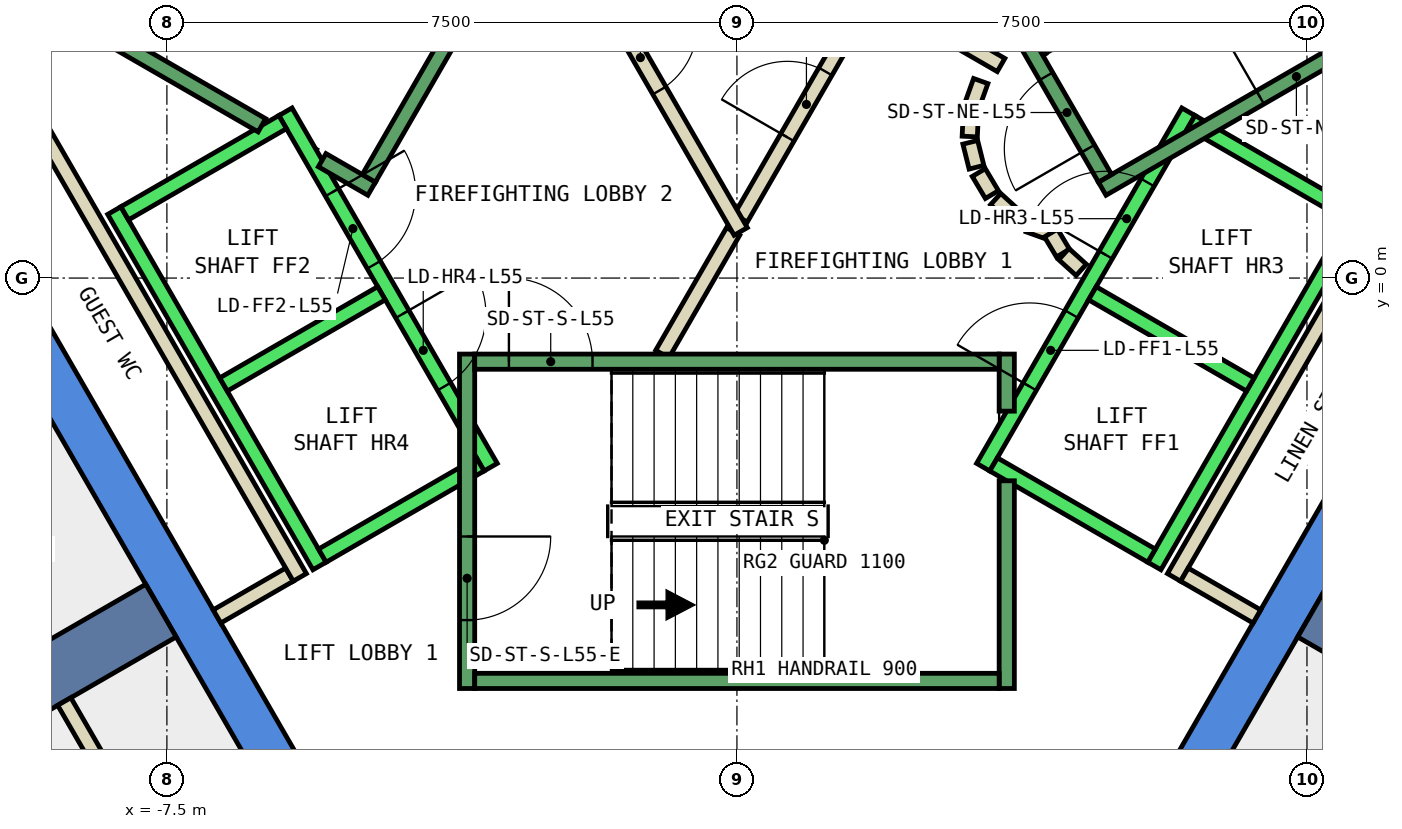
"""IFC4 building model, lengths in metres.
Left out: names, types, materials, properties, quantities, classifications, styles, units other than length and angle.
Written with IfcOpenShell. Run it as: python <this file> out.ifc"""

import sys

from ifc_helpers import new_model, si_unit, direction, frame, frame_2d, origin, place, context, subcontext, project, spatial, polyline, rectangle, outline, extrude, element, fill, save


model = new_model("IFC4")
c1 = context("Model", 3, precision=1e-05, world=origin(), true_north=direction((0.0, 1.0)))
c2 = subcontext(c1, "Body", "Model", "MODEL_VIEW")
j1 = project(units=[si_unit("LENGTHUNIT", "METRE"), si_unit("PLANEANGLEUNIT", "RADIAN")], contexts=[c1])
p1 = place(None, origin())
s1 = spatial("IfcSite", under=j1, at=p1, CompositionType="ELEMENT")
p2 = place(p1, origin())
s2 = spatial("IfcBuilding", under=s1, at=p2, CompositionType="ELEMENT")
p3 = place(p2, frame((0.0, 0.0, 245.0)))
s3 = spatial("IfcBuildingStorey", under=s2, at=p3, CompositionType="ELEMENT", Elevation=245.0)
p4 = place(p3, frame((0.0, 0.0, -0.34)))
e1 = element("IfcWall", 1, at=p4, inside=s3, PredefinedType="SHEAR", context=c2, shape_type="SweptSolid", body=[
    extrude(outline(polyline([(6.786, 10.747), (6.266, 10.447), (10.854, 2.5), (11.547, 2.5), (6.786, 10.747)])), origin(), (0.0, 0.0, 1.0), 3.6),
])
p5 = place(p3, frame((0.0, 0.0, -0.34)))
e2 = element("IfcWall", 2, at=p5, inside=s3, PredefinedType="SHEAR", context=c2, shape_type="SweptSolid", body=[
    extrude(outline(polyline([(-11.547, 2.5), (-5.774, -7.5), (-5.427, -6.9), (-10.854, 2.5), (-11.547, 2.5)])), origin(), (0.0, 0.0, 1.0), 3.6),
])
p6 = place(p3, frame((0.0, 0.0, -0.34)))
e3 = element("IfcWall", 3, at=p6, inside=s3, PredefinedType="SHEAR", context=c2, shape_type="SweptSolid", body=[
    extrude(outline(polyline([(5.774, -7.5), (11.547, 2.5), (10.854, 2.5), (5.427, -6.9), (5.774, -7.5)])), origin(), (0.0, 0.0, 1.0), 3.6),
])
for number, where, z_axis, x_axis in (
    (4, (7.578, -4.375, -0.34), (0.0, 0.0, 1.0), (0.866, -0.5, 0.0)),
    (5, (-7.578, -4.375, -0.34), (0.0, 0.0, 1.0), (-0.866, -0.5, 0.0)),
):
    element("IfcWall", number, at=place(p3, frame(where, z_axis=z_axis, x_axis=x_axis)), inside=s3, PredefinedType="SHEAR", context=c2, shape_type="SweptSolid", body=[
        extrude(rectangle(XDim=9.0, YDim=0.8, at=frame_2d((4.5, 0.0))), origin(), (0.0, 0.0, 1.0), 3.6),
    ])
p7 = place(p3, frame((-8.235, -6.636, 0.0), z_axis=(0.0, 0.0, 1.0), x_axis=(-0.500089055364, 0.86597398154, 0.0)))
e6 = element("IfcWall", 6, at=p7, inside=s3, PredefinedType="PARTITIONING", context=c2, shape_type="SweptSolid", body=[
    extrude(rectangle(XDim=1.23, YDim=0.2, at=frame_2d((0.615, 0.0))), origin(), (0.0, 0.0, 1.0), 3.26),
])
p8 = place(p3, frame((5.751, -3.938, 0.0), z_axis=(0.0, 0.0, 1.0), x_axis=(0.500034260056, 0.866005622828, 0.0)))
e7 = element("IfcWall", 7, at=p8, inside=s3, PredefinedType="PARTITIONING", context=c2, shape_type="SweptSolid", body=[
    extrude(rectangle(XDim=5.399, YDim=0.2, at=frame_2d((2.7, 0.0))), origin(), (0.0, 0.0, 1.0), 3.26),
])
for number, where, z_axis, x_axis in (
    (8, (6.841, -4.452, 0.0), (0.0, 0.0, 1.0), (-0.866, 0.5, 0.0)),
    (9, (-5.888, -3.902, 0.0), (0.0, 0.0, 1.0), (-0.866, -0.5, 0.0)),
):
    element("IfcWall", number, at=place(p3, frame(where, z_axis=z_axis, x_axis=x_axis)), inside=s3, PredefinedType="PARTITIONING", context=c2, shape_type="SweptSolid", body=[
        extrude(rectangle(XDim=1.1, YDim=0.2, at=frame_2d((0.55, 0.0))), origin(), (0.0, 0.0, 1.0), 3.26),
    ])
p9 = place(p3, frame((-9.751, 2.99, 0.0), z_axis=(0.0, 0.0, 1.0), x_axis=(0.500012163284, -0.866018381195, 0.0)))
e10 = element("IfcWall", 10, at=p9, inside=s3, PredefinedType="PARTITIONING", context=c2, shape_type="SweptSolid", body=[
    extrude(rectangle(XDim=8.0, YDim=0.2, at=frame_2d((4.0, 0.0))), origin(), (0.0, 0.0, 1.0), 3.26),
])
p10 = place(p3, frame((-0.982, -1.0, 0.0), z_axis=(0.0, 0.0, 1.0), x_axis=(0.50024047865, 0.865886518847, 0.0)))
e11 = element("IfcWall", 11, at=p10, inside=s3, PredefinedType="PARTITIONING", context=c2, shape_type="SweptSolid", body=[
    extrude(rectangle(XDim=1.863, YDim=0.2, at=frame_2d((0.931, 0.0))), origin(), (0.0, 0.0, 1.0), 3.26),
])
p11 = place(p3, frame((0.05, 0.787, 0.0), z_axis=(0.0, 0.0, 1.0), x_axis=(0.499954076797, 0.866051915934, 0.0)))
e12 = element("IfcWall", 12, at=p11, inside=s3, PredefinedType="PARTITIONING", context=c2, shape_type="SweptSolid", body=[
    extrude(rectangle(XDim=3.558, YDim=0.2, at=frame_2d((1.779, 0.0))), origin(), (0.0, 0.0, 1.0), 3.26),
])
p12 = place(p11, frame((1.229, 0.0, 0.0)))
e13 = element("IfcOpeningElement", 13, at=p12, cuts=e12, PredefinedType="OPENING", context=c2, shape_type="SweptSolid", body=[
    extrude(rectangle(XDim=1.0, YDim=2.1, at=frame_2d((0.5, 1.05))), frame((0.0, 0.11, 0.0), z_axis=(0.0, -1.0, 0.0), x_axis=(1.0, 0.0, 0.0)), (0.0, 0.0, 1.0), 0.22),
])
p13 = place(p3, frame((1.866, 3.732, 0.0), z_axis=(0.0, 0.0, 1.0), x_axis=(0.866043361281, -0.499968895414, 0.0)))
e14 = element("IfcWall", 14, at=p13, inside=s3, PredefinedType="PARTITIONING", context=c2, shape_type="SweptSolid", body=[
    extrude(rectangle(XDim=1.858, YDim=0.2, at=frame_2d((0.929, 0.0))), origin(), (0.0, 0.0, 1.0), 3.26),
])
p14 = place(p3, frame((3.208, 2.592, 0.0), z_axis=(0.0, 0.0, 1.0), x_axis=(-0.337388820924, -0.941365382578, 0.0)))
e15 = element("IfcWall", 15, at=p14, inside=s3, PredefinedType="PARTITIONING", context=c2, shape_type="SweptSolid", body=[
    extrude(rectangle(XDim=0.338, YDim=0.2, at=frame_2d((0.169, 0.0))), origin(), (0.0, 0.0, 1.0), 3.26),
])
p15 = place(p3, frame((3.079, 2.199, 0.0), z_axis=(0.0, 0.0, 1.0), x_axis=(-0.047771483479, -0.998858290933, 0.0)))
e16 = element("IfcWall", 16, at=p15, inside=s3, PredefinedType="PARTITIONING", context=c2, shape_type="SweptSolid", body=[
    extrude(rectangle(XDim=0.337, YDim=0.2, at=frame_2d((0.169, 0.0))), origin(), (0.0, 0.0, 1.0), 3.26),
])
p16 = place(p3, frame((3.07, 1.786, 0.0), z_axis=(0.0, 0.0, 1.0), x_axis=(0.242705583207, -0.970099994784, 0.0)))
e17 = element("IfcWall", 17, at=p16, inside=s3, PredefinedType="PARTITIONING", context=c2, shape_type="SweptSolid", body=[
    extrude(rectangle(XDim=0.338, YDim=0.2, at=frame_2d((0.169, 0.0))), origin(), (0.0, 0.0, 1.0), 3.26),
])
for number, where, z_axis, x_axis in (
    (18, (3.182, 1.388, 0.0), (0.0, 0.0, 1.0), (0.512, -0.859, 0.0)),
    (19, (3.404, 1.039, 0.0), (0.0, 0.0, 1.0), (0.74, -0.672, 0.0)),
):
    element("IfcWall", number, at=place(p3, frame(where, z_axis=z_axis, x_axis=x_axis)), inside=s3, PredefinedType="PARTITIONING", context=c2, shape_type="SweptSolid", body=[
        extrude(rectangle(XDim=0.338, YDim=0.2, at=frame_2d((0.169, 0.0))), origin(), (0.0, 0.0, 1.0), 3.26),
    ])
p17 = place(p3, frame((3.838, 0.702, 0.0), z_axis=(0.0, 0.0, 1.0), x_axis=(0.941035081519, -0.338308993895, 0.0)))
e20 = element("IfcWall", 20, at=p17, inside=s3, PredefinedType="PARTITIONING", context=c2, shape_type="SweptSolid", body=[
    extrude(rectangle(XDim=0.337, YDim=0.2, at=frame_2d((0.168, 0.0))), origin(), (0.0, 0.0, 1.0), 3.26),
])
p18 = place(p3, frame((4.132, 0.593, 0.0), z_axis=(0.0, 0.0, 1.0), x_axis=(0.513561617048, -0.858052717201, 0.0)))
e21 = element("IfcWall", 21, at=p18, inside=s3, PredefinedType="PARTITIONING", context=c2, shape_type="SweptSolid", body=[
    extrude(rectangle(XDim=0.308, YDim=0.2, at=frame_2d((0.154, 0.0))), origin(), (0.0, 0.0, 1.0), 3.26),
])
p19 = place(p3, frame((4.301, 0.315, 0.0), z_axis=(0.0, 0.0, 1.0), x_axis=(0.741798017506, -0.670623367639, 0.0)))
e22 = element("IfcWall", 22, at=p19, inside=s3, PredefinedType="PARTITIONING", context=c2, shape_type="SweptSolid", body=[
    extrude(rectangle(XDim=0.309, YDim=0.2, at=frame_2d((0.154, 0.0))), origin(), (0.0, 0.0, 1.0), 3.26),
])
p20 = place(p3, frame((-2.54, 5.1, 0.0), z_axis=(0.0, 0.0, 1.0), x_axis=(0.499925051871, -0.866068670783, 0.0)))
e23 = element("IfcWall", 23, at=p20, inside=s3, PredefinedType="PARTITIONING", context=c2, shape_type="SweptSolid", body=[
    extrude(rectangle(XDim=5.181, YDim=0.2, at=frame_2d((2.59, 0.0))), origin(), (0.0, 0.0, 1.0), 3.26),
])
p21 = place(p20, frame((2.04, 0.0, 0.0)))
e24 = element("IfcOpeningElement", 24, at=p21, cuts=e23, PredefinedType="OPENING", context=c2, shape_type="SweptSolid", body=[
    extrude(rectangle(XDim=1.0, YDim=2.1, at=frame_2d((0.5, 1.05))), frame((0.0, 0.11, 0.0), z_axis=(0.0, -1.0, 0.0), x_axis=(1.0, 0.0, 0.0)), (0.0, 0.0, 1.0), 0.22),
])
p22 = place(p3, frame((-5.94, 2.188, 0.0), z_axis=(0.0, 0.0, 1.0), x_axis=(0.500034260056, -0.866005622828, 0.0)))
e25 = element("IfcWall", 25, at=p22, inside=s3, PredefinedType="STANDARD", context=c2, shape_type="SweptSolid", body=[
    extrude(rectangle(XDim=5.399, YDim=0.2, at=frame_2d((2.7, 0.0))), origin(), (0.0, 0.0, 1.0), 3.26),
])
p23 = place(p22, frame((3.075, 0.0, 0.0)))
e26 = element("IfcOpeningElement", 26, at=p23, cuts=e25, PredefinedType="OPENING", context=c2, shape_type="SweptSolid", body=[
    extrude(rectangle(XDim=1.1, YDim=2.1, at=frame_2d((0.55, 1.05))), frame((0.0, 0.11, 0.0), z_axis=(0.0, -1.0, 0.0), x_axis=(1.0, 0.0, 0.0)), (0.0, 0.0, 1.0), 0.22),
])
p24 = place(p22, frame((1.225, 0.0, 0.0)))
e27 = element("IfcOpeningElement", 27, at=p24, cuts=e25, PredefinedType="OPENING", context=c2, shape_type="SweptSolid", body=[
    extrude(rectangle(XDim=1.1, YDim=2.1, at=frame_2d((0.55, 1.05))), frame((0.0, 0.11, 0.0), z_axis=(0.0, -1.0, 0.0), x_axis=(1.0, 0.0, 0.0)), (0.0, 0.0, 1.0), 0.22),
])
p25 = place(p3, frame((-8.192, 0.888, 0.0), z_axis=(0.0, 0.0, 1.0), x_axis=(0.500034260056, -0.866005622828, 0.0)))
e28 = element("IfcWall", 28, at=p25, inside=s3, PredefinedType="STANDARD", context=c2, shape_type="SweptSolid", body=[
    extrude(rectangle(XDim=5.399, YDim=0.2, at=frame_2d((2.7, 0.0))), origin(), (0.0, 0.0, 1.0), 3.26),
])
for number, where, z_axis, x_axis in (
    (29, (-5.977, 2.052, 0.0), (0.0, 0.0, 1.0), (-0.866, -0.5, 0.0)),
    (30, (-4.677, -0.2, 0.0), (0.0, 0.0, 1.0), (-0.866, -0.5, 0.0)),
):
    element("IfcWall", number, at=place(p3, frame(where, z_axis=z_axis, x_axis=x_axis)), inside=s3, PredefinedType="STANDARD", context=c2, shape_type="SweptSolid", body=[
        extrude(rectangle(XDim=2.399, YDim=0.2, at=frame_2d((1.2, 0.0))), origin(), (0.0, 0.0, 1.0), 3.26),
    ])
p26 = place(p3, frame((-3.377, -2.452, 0.0), z_axis=(0.0, 0.0, 1.0), x_axis=(-0.865955154139, -0.50012165622, 0.0)))
e31 = element("IfcWall", 31, at=p26, inside=s3, PredefinedType="STANDARD", context=c2, shape_type="SweptSolid", body=[
    extrude(rectangle(XDim=2.4, YDim=0.2, at=frame_2d((1.2, 0.0))), origin(), (0.0, 0.0, 1.0), 3.26),
])
p27 = place(p3, frame((3.24, -2.488, 0.0), z_axis=(0.0, 0.0, 1.0), x_axis=(0.500034260056, 0.866005622828, 0.0)))
e32 = element("IfcWall", 32, at=p27, inside=s3, PredefinedType="STANDARD", context=c2, shape_type="SweptSolid", body=[
    extrude(rectangle(XDim=5.399, YDim=0.2, at=frame_2d((2.7, 0.0))), origin(), (0.0, 0.0, 1.0), 3.26),
])
p28 = place(p27, frame((3.225, 0.0, 0.0)))
e33 = element("IfcOpeningElement", 33, at=p28, cuts=e32, PredefinedType="OPENING", context=c2, shape_type="SweptSolid", body=[
    extrude(rectangle(XDim=1.1, YDim=2.1, at=frame_2d((0.55, 1.05))), frame((0.0, 0.11, 0.0), z_axis=(0.0, -1.0, 0.0), x_axis=(1.0, 0.0, 0.0)), (0.0, 0.0, 1.0), 0.22),
])
p29 = place(p27, frame((1.225, 0.0, 0.0)))
e34 = element("IfcOpeningElement", 34, at=p29, cuts=e32, PredefinedType="OPENING", context=c2, shape_type="SweptSolid", body=[
    extrude(rectangle(XDim=1.1, YDim=2.1, at=frame_2d((0.55, 1.05))), frame((0.0, 0.11, 0.0), z_axis=(0.0, -1.0, 0.0), x_axis=(1.0, 0.0, 0.0)), (0.0, 0.0, 1.0), 0.22),
])
p30 = place(p3, frame((5.492, -3.788, 0.0), z_axis=(0.0, 0.0, 1.0), x_axis=(0.500034260056, 0.866005622828, 0.0)))
e35 = element("IfcWall", 35, at=p30, inside=s3, PredefinedType="STANDARD", context=c2, shape_type="SweptSolid", body=[
    extrude(rectangle(XDim=5.399, YDim=0.2, at=frame_2d((2.7, 0.0))), origin(), (0.0, 0.0, 1.0), 3.26),
])
p31 = place(p3, frame((3.377, -2.452, 0.0), z_axis=(0.0, 0.0, 1.0), x_axis=(0.865955154139, -0.50012165622, 0.0)))
e36 = element("IfcWall", 36, at=p31, inside=s3, PredefinedType="STANDARD", context=c2, shape_type="SweptSolid", body=[
    extrude(rectangle(XDim=2.4, YDim=0.2, at=frame_2d((1.2, 0.0))), origin(), (0.0, 0.0, 1.0), 3.26),
])
for number, where, z_axis, x_axis in (
    (37, (4.677, -0.2, 0.0), (0.0, 0.0, 1.0), (0.866, -0.5, 0.0)),
    (38, (5.977, 2.052, 0.0), (0.0, 0.0, 1.0), (0.866, -0.5, 0.0)),
):
    element("IfcWall", number, at=place(p3, frame(where, z_axis=z_axis, x_axis=x_axis)), inside=s3, PredefinedType="STANDARD", context=c2, shape_type="SweptSolid", body=[
        extrude(rectangle(XDim=2.399, YDim=0.2, at=frame_2d((1.2, 0.0))), origin(), (0.0, 0.0, 1.0), 3.26),
    ])
p32 = place(p3, frame((-3.55, -1.0, 0.0), z_axis=(0.0, 0.0, 1.0), x_axis=(0.0, -1.0, 0.0)))
e39 = element("IfcWall", 39, at=p32, inside=s3, PredefinedType="STANDARD", context=c2, shape_type="SweptSolid", body=[
    extrude(rectangle(XDim=4.4, YDim=0.2, at=frame_2d((2.2, 0.0))), origin(), (0.0, 0.0, 1.0), 3.26),
])
p33 = place(p32, frame((2.4, 0.0, 0.0)))
e40 = element("IfcOpeningElement", 40, at=p33, cuts=e39, PredefinedType="OPENING", context=c2, shape_type="SweptSolid", body=[
    extrude(rectangle(XDim=1.1, YDim=2.2, at=frame_2d((0.55, 1.1))), frame((0.0, 0.11, 0.0), z_axis=(0.0, -1.0, 0.0), x_axis=(1.0, 0.0, 0.0)), (0.0, 0.0, 1.0), 0.22),
])
p34 = place(p3, frame((3.55, -2.667, 0.0), z_axis=(0.0, 0.0, 1.0), x_axis=(0.0, -1.0, 0.0)))
e41 = element("IfcWall", 41, at=p34, inside=s3, PredefinedType="STANDARD", context=c2, shape_type="SweptSolid", body=[
    extrude(rectangle(XDim=2.733, YDim=0.2, at=frame_2d((1.366, 0.0))), origin(), (0.0, 0.0, 1.0), 3.26),
])
p35 = place(p3, frame((3.55, -1.0, 0.0), z_axis=(0.0, 0.0, 1.0), x_axis=(0.0, -1.0, 0.0)))
e42 = element("IfcWall", 42, at=p35, inside=s3, PredefinedType="STANDARD", context=c2, shape_type="SweptSolid", body=[
    extrude(rectangle(XDim=0.751, YDim=0.2, at=frame_2d((0.375, 0.0))), origin(), (0.0, 0.0, 1.0), 3.26),
])
p36 = place(p3, frame((-3.45, -1.1, 0.0), z_axis=(0.0, 0.0, 1.0), x_axis=(1.0, 0.0, 0.0)))
e43 = element("IfcWall", 43, at=p36, inside=s3, PredefinedType="STANDARD", context=c2, shape_type="SweptSolid", body=[
    extrude(rectangle(XDim=6.9, YDim=0.2, at=frame_2d((3.45, 0.0))), origin(), (0.0, 0.0, 1.0), 3.26),
])
p37 = place(p36, frame((0.45, 0.0, 0.0)))
e44 = element("IfcOpeningElement", 44, at=p37, cuts=e43, PredefinedType="OPENING", context=c2, shape_type="SweptSolid", body=[
    extrude(rectangle(XDim=1.1, YDim=2.2, at=frame_2d((0.55, 1.1))), frame((0.0, 0.11, 0.0), z_axis=(0.0, -1.0, 0.0), x_axis=(1.0, 0.0, 0.0)), (0.0, 0.0, 1.0), 0.22),
])
p38 = place(p3, frame((-3.45, -5.3, 0.0), z_axis=(0.0, 0.0, 1.0), x_axis=(1.0, 0.0, 0.0)))
e45 = element("IfcWall", 45, at=p38, inside=s3, PredefinedType="STANDARD", context=c2, shape_type="SweptSolid", body=[
    extrude(rectangle(XDim=6.9, YDim=0.2, at=frame_2d((3.45, 0.0))), origin(), (0.0, 0.0, 1.0), 3.26),
])
p39 = place(p3, frame((4.806, 1.176, 0.0), z_axis=(0.0, 0.0, 1.0), x_axis=(0.866059941101, 0.499940174841, 0.0)))
e46 = element("IfcWall", 46, at=p39, inside=s3, PredefinedType="STANDARD", context=c2, shape_type="SweptSolid", body=[
    extrude(rectangle(XDim=4.4, YDim=0.2, at=frame_2d((2.2, 0.0))), origin(), (0.0, 0.0, 1.0), 3.26),
])
p40 = place(p39, frame((2.4, 0.0, 0.0)))
e47 = element("IfcOpeningElement", 47, at=p40, cuts=e46, PredefinedType="OPENING", context=c2, shape_type="SweptSolid", body=[
    extrude(rectangle(XDim=1.1, YDim=2.2, at=frame_2d((0.55, 1.1))), frame((0.0, 0.11, 0.0), z_axis=(0.0, -1.0, 0.0), x_axis=(1.0, 0.0, 0.0)), (0.0, 0.0, 1.0), 0.22),
])
p41 = place(p3, frame((4.843, 1.312, 0.0), z_axis=(0.0, 0.0, 1.0), x_axis=(-0.499963383562, 0.866046543262, 0.0)))
e48 = element("IfcWall", 48, at=p41, inside=s3, PredefinedType="STANDARD", context=c2, shape_type="SweptSolid", body=[
    extrude(rectangle(XDim=6.9, YDim=0.2, at=frame_2d((3.45, 0.0))), origin(), (0.0, 0.0, 1.0), 3.26),
])
p42 = place(p41, frame((0.45, 0.0, 0.0)))
e49 = element("IfcOpeningElement", 49, at=p42, cuts=e48, PredefinedType="OPENING", context=c2, shape_type="SweptSolid", body=[
    extrude(rectangle(XDim=1.1, YDim=2.2, at=frame_2d((0.55, 1.1))), frame((0.0, 0.11, 0.0), z_axis=(0.0, -1.0, 0.0), x_axis=(1.0, 0.0, 0.0)), (0.0, 0.0, 1.0), 0.22),
])
p43 = place(p3, frame((-6.25, 2.01, 0.0), z_axis=(0.0, 0.0, 1.0), x_axis=(-0.86611865017, 0.499838457731, 0.0)))
e50 = element("IfcWall", 50, at=p43, inside=s3, PredefinedType="STANDARD", context=c2, shape_type="SweptSolid", body=[
    extrude(rectangle(XDim=2.733, YDim=0.2, at=frame_2d((1.366, 0.0))), origin(), (0.0, 0.0, 1.0), 3.26),
])
p44 = place(p3, frame((-4.806, 1.176, 0.0), z_axis=(0.0, 0.0, 1.0), x_axis=(-0.866558586415, 0.499075361355, 0.0)))
e51 = element("IfcWall", 51, at=p44, inside=s3, PredefinedType="STANDARD", context=c2, shape_type="SweptSolid", body=[
    extrude(rectangle(XDim=0.751, YDim=0.2, at=frame_2d((0.376, 0.0))), origin(), (0.0, 0.0, 1.0), 3.26),
])
p45 = place(p3, frame((-1.393, 7.288, 0.0), z_axis=(0.0, 0.0, 1.0), x_axis=(-0.499963383562, -0.866046543262, 0.0)))
e52 = element("IfcWall", 52, at=p45, inside=s3, PredefinedType="STANDARD", context=c2, shape_type="SweptSolid", body=[
    extrude(rectangle(XDim=6.9, YDim=0.2, at=frame_2d((3.45, 0.0))), origin(), (0.0, 0.0, 1.0), 3.26),
])
p46 = place(p45, frame((0.45, 0.0, 0.0)))
e53 = element("IfcOpeningElement", 53, at=p46, cuts=e52, PredefinedType="OPENING", context=c2, shape_type="SweptSolid", body=[
    extrude(rectangle(XDim=1.1, YDim=2.2, at=frame_2d((0.55, 1.1))), frame((0.0, 0.11, 0.0), z_axis=(0.0, -1.0, 0.0), x_axis=(1.0, 0.0, 0.0)), (0.0, 0.0, 1.0), 0.22),
])
p47 = place(p12, origin())
e54 = element("IfcDoor", 54, at=p47, inside=s3, OperationType="SINGLE_SWING_RIGHT", PredefinedType="DOOR", context=c2, shape_type="SweptSolid", body=[
    extrude(rectangle(XDim=1.0, YDim=2.1, at=frame_2d((0.5, 1.05))), frame((0.0, 0.025, 0.0), z_axis=(0.0, -1.0, 0.0), x_axis=(1.0, 0.0, 0.0)), (0.0, 0.0, 1.0), 0.05),
])
fill(e13, e54)
p48 = place(p21, origin())
e55 = element("IfcDoor", 55, at=p48, inside=s3, OperationType="SINGLE_SWING_RIGHT", PredefinedType="DOOR", context=c2, shape_type="SweptSolid", body=[
    extrude(rectangle(XDim=1.0, YDim=2.1, at=frame_2d((0.5, 1.05))), frame((0.0, 0.025, 0.0), z_axis=(0.0, -1.0, 0.0), x_axis=(1.0, 0.0, 0.0)), (0.0, 0.0, 1.0), 0.05),
])
fill(e24, e55)
p49 = place(p28, origin())
e56 = element("IfcDoor", 56, at=p49, inside=s3, OperationType="SLIDING_TO_LEFT", PredefinedType="DOOR", context=c2, shape_type="SweptSolid", body=[
    extrude(rectangle(XDim=1.1, YDim=2.1, at=frame_2d((0.55, 1.05))), frame((0.0, 0.025, 0.0), z_axis=(0.0, -1.0, 0.0), x_axis=(1.0, 0.0, 0.0)), (0.0, 0.0, 1.0), 0.05),
])
fill(e33, e56)
p50 = place(p23, origin())
e57 = element("IfcDoor", 57, at=p50, inside=s3, OperationType="SLIDING_TO_LEFT", PredefinedType="DOOR", context=c2, shape_type="SweptSolid", body=[
    extrude(rectangle(XDim=1.1, YDim=2.1, at=frame_2d((0.55, 1.05))), frame((0.0, 0.025, 0.0), z_axis=(0.0, -1.0, 0.0), x_axis=(1.0, 0.0, 0.0)), (0.0, 0.0, 1.0), 0.05),
])
fill(e26, e57)
p51 = place(p29, origin())
e58 = element("IfcDoor", 58, at=p51, inside=s3, OperationType="SLIDING_TO_LEFT", PredefinedType="DOOR", context=c2, shape_type="SweptSolid", body=[
    extrude(rectangle(XDim=1.1, YDim=2.1, at=frame_2d((0.55, 1.05))), frame((0.0, 0.025, 0.0), z_axis=(0.0, -1.0, 0.0), x_axis=(1.0, 0.0, 0.0)), (0.0, 0.0, 1.0), 0.05),
])
fill(e34, e58)
p52 = place(p24, origin())
e59 = element("IfcDoor", 59, at=p52, inside=s3, OperationType="SLIDING_TO_LEFT", PredefinedType="DOOR", context=c2, shape_type="SweptSolid", body=[
    extrude(rectangle(XDim=1.1, YDim=2.1, at=frame_2d((0.55, 1.05))), frame((0.0, 0.025, 0.0), z_axis=(0.0, -1.0, 0.0), x_axis=(1.0, 0.0, 0.0)), (0.0, 0.0, 1.0), 0.05),
])
fill(e27, e59)
p53 = place(p37, origin())
e60 = element("IfcDoor", 60, at=p53, inside=s3, OperationType="SINGLE_SWING_LEFT", PredefinedType="DOOR", context=c2, shape_type="SweptSolid", body=[
    extrude(rectangle(XDim=1.1, YDim=2.2, at=frame_2d((0.55, 1.1))), frame((0.0, 0.025, 0.0), z_axis=(0.0, -1.0, 0.0), x_axis=(1.0, 0.0, 0.0)), (0.0, 0.0, 1.0), 0.05),
])
fill(e44, e60)
p54 = place(p33, origin())
e61 = element("IfcDoor", 61, at=p54, inside=s3, OperationType="SINGLE_SWING_LEFT", PredefinedType="DOOR", context=c2, shape_type="SweptSolid", body=[
    extrude(rectangle(XDim=1.1, YDim=2.2, at=frame_2d((0.55, 1.1))), frame((0.0, 0.025, 0.0), z_axis=(0.0, -1.0, 0.0), x_axis=(1.0, 0.0, 0.0)), (0.0, 0.0, 1.0), 0.05),
])
fill(e40, e61)
p55 = place(p42, origin())
e62 = element("IfcDoor", 62, at=p55, inside=s3, OperationType="SINGLE_SWING_LEFT", PredefinedType="DOOR", context=c2, shape_type="SweptSolid", body=[
    extrude(rectangle(XDim=1.1, YDim=2.2, at=frame_2d((0.55, 1.1))), frame((0.0, 0.025, 0.0), z_axis=(0.0, -1.0, 0.0), x_axis=(1.0, 0.0, 0.0)), (0.0, 0.0, 1.0), 0.05),
])
fill(e49, e62)
p56 = place(p40, origin())
e63 = element("IfcDoor", 63, at=p56, inside=s3, OperationType="SINGLE_SWING_LEFT", PredefinedType="DOOR", context=c2, shape_type="SweptSolid", body=[
    extrude(rectangle(XDim=1.1, YDim=2.2, at=frame_2d((0.55, 1.1))), frame((0.0, 0.025, 0.0), z_axis=(0.0, -1.0, 0.0), x_axis=(1.0, 0.0, 0.0)), (0.0, 0.0, 1.0), 0.05),
])
fill(e47, e63)
save(model, sys.argv[1])
